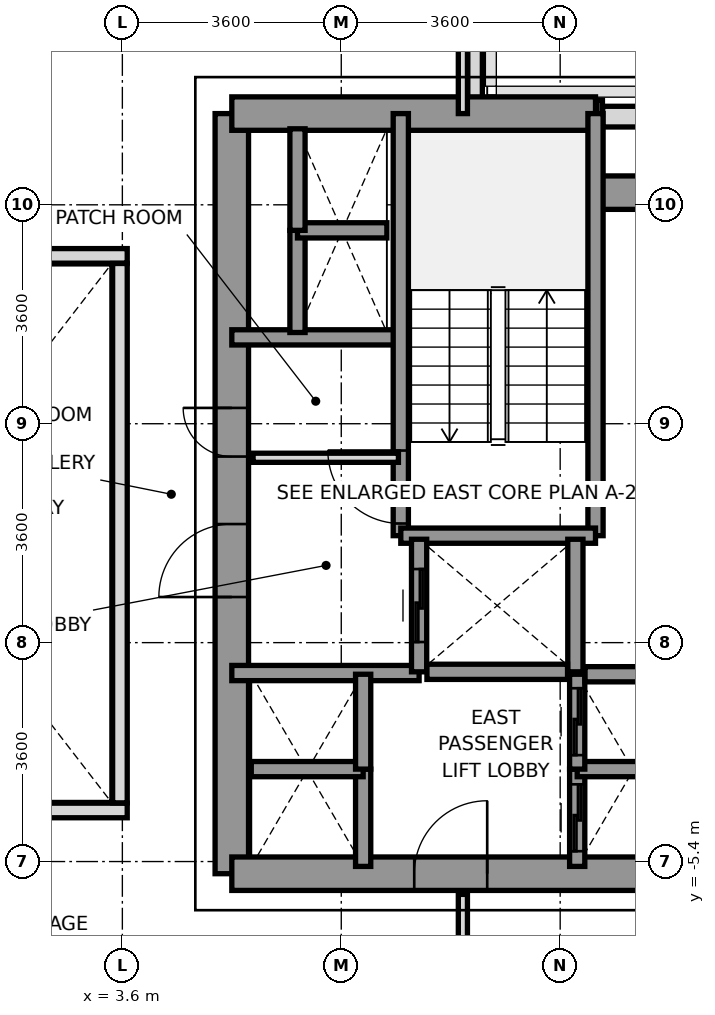
"""IFC4 building model, lengths in metres.
Left out: names, types, materials, properties, quantities, classifications, styles, units other than length and angle.
Written with IfcOpenShell. Run it as: python <this file> out.ifc"""

import sys

from ifc_helpers import new_model, si_unit, direction, frame, frame_2d, origin, place, context, subcontext, project, spatial, rectangle, extrude, source, transform, mapped, element, fill, save


model = new_model("IFC4")
c1 = context("Model", 3, precision=1e-05, world=origin(), true_north=direction((0.0, 1.0)))
c2 = subcontext(c1, "Body", "Model", "MODEL_VIEW")
j1 = project(units=[si_unit("LENGTHUNIT", "METRE"), si_unit("PLANEANGLEUNIT", "RADIAN")], contexts=[c1])
p1 = place(None, origin())
s1 = spatial("IfcSite", under=j1, at=p1, CompositionType="ELEMENT")
p2 = place(p1, origin())
s2 = spatial("IfcBuilding", under=s1, at=p2, CompositionType="ELEMENT")
p3 = place(p2, frame((0.0, 0.0, 34.0)))
s3 = spatial("IfcBuildingStorey", under=s2, at=p3, CompositionType="ELEMENT", Elevation=34.0)
p4 = place(p3, frame((11.498, 6.85, 0.0), z_axis=(0.0, 0.0, 1.0), x_axis=(1.0, 0.0, 0.0)))
e1 = element("IfcWall", 1, at=p4, inside=s3, PredefinedType="SOLIDWALL", context=c2, shape_type="SweptSolid", body=[
    extrude(rectangle(XDim=2.535, YDim=0.34, at=frame_2d((1.268, 0.0))), origin(), (0.0, 0.0, 1.0), 3.2),
])
p5 = place(p3, frame((9.4, 8.397, 0.0), z_axis=(0.0, 0.0, 1.0), x_axis=(0.0, -1.0, 0.0)))
e2 = element("IfcWall", 2, at=p5, inside=s3, PredefinedType="PARAPET", context=c2, shape_type="SweptSolid", body=[
    extrude(rectangle(XDim=1.444, YDim=0.24, at=frame_2d((0.722, 0.0))), origin(), (0.0, 0.0, 1.0), 1.15),
])
p6 = place(p3, frame((11.403, 7.0, 0.0), z_axis=(0.0, 0.0, 1.0), x_axis=(1.0, 0.0, 0.0)))
e3 = element("IfcWall", 3, at=p6, inside=s3, PredefinedType="PARAPET", context=c2, shape_type="SweptSolid", body=[
    extrude(rectangle(XDim=0.092, YDim=0.24, at=frame_2d((0.046, 0.0))), origin(), (0.0, 0.0, 1.0), 1.15),
])
p7 = place(p3, frame((5.4, -5.6, 0.0), z_axis=(0.0, 0.0, 1.0), x_axis=(0.0, 1.0, 0.0)))
e4 = element("IfcWall", 4, at=p7, inside=s3, PredefinedType="SHEAR", context=c2, shape_type="SweptSolid", body=[
    extrude(rectangle(XDim=12.5, YDim=0.55, at=frame_2d((6.25, 0.0))), origin(), (0.0, 0.0, 1.0), 3.2),
])
p8 = place(p7, frame((4.55, 0.0, 0.0)))
e5 = element("IfcOpeningElement", 5, at=p8, cuts=e4, PredefinedType="OPENING", context=c2, shape_type="SweptSolid", body=[
    extrude(rectangle(XDim=1.2, YDim=2.2, at=frame_2d((0.6, 1.1))), frame((0.0, 0.285, 0.0), z_axis=(0.0, -1.0, 0.0), x_axis=(1.0, 0.0, 0.0)), (0.0, 0.0, 1.0), 0.57),
])
p9 = place(p7, frame((6.86, 0.0, 0.0)))
e6 = element("IfcOpeningElement", 6, at=p9, cuts=e4, PredefinedType="OPENING", context=c2, shape_type="SweptSolid", body=[
    extrude(rectangle(XDim=0.8, YDim=2.1, at=frame_2d((0.4, 1.05))), frame((0.0, 0.285, 0.0), z_axis=(0.0, -1.0, 0.0), x_axis=(1.0, 0.0, 0.0)), (0.0, 0.0, 1.0), 0.57),
])
p10 = place(p3, frame((5.4, 6.9, 0.0), z_axis=(0.0, 0.0, 1.0), x_axis=(1.0, 0.0, 0.0)))
e7 = element("IfcWall", 7, at=p10, inside=s3, PredefinedType="SHEAR", context=c2, shape_type="SweptSolid", body=[
    extrude(rectangle(XDim=5.981, YDim=0.55, at=frame_2d((2.991, 0.0))), origin(), (0.0, 0.0, 1.0), 3.2),
])
p11 = place(p3, frame((11.381, 5.6, 0.0), z_axis=(0.0, 0.0, 1.0), x_axis=(1.0, 0.0, 0.0)))
e8 = element("IfcWall", 8, at=p11, inside=s3, PredefinedType="SHEAR", context=c2, shape_type="SweptSolid", body=[
    extrude(rectangle(XDim=1.819, YDim=0.55, at=frame_2d((0.909, 0.0))), origin(), (0.0, 0.0, 1.0), 3.2),
])
p12 = place(p3, frame((5.4, -5.6, 0.0), z_axis=(0.0, 0.0, 1.0), x_axis=(1.0, 0.0, 0.0)))
e9 = element("IfcWall", 9, at=p12, inside=s3, PredefinedType="SHEAR", context=c2, shape_type="SweptSolid", body=[
    extrude(rectangle(XDim=7.8, YDim=0.55, at=frame_2d((3.9, 0.0))), origin(), (0.0, 0.0, 1.0), 3.2),
])
p13 = place(p12, frame((3.0, 0.0, 0.0)))
e10 = element("IfcOpeningElement", 10, at=p13, cuts=e9, PredefinedType="OPENING", context=c2, shape_type="SweptSolid", body=[
    extrude(rectangle(XDim=1.2, YDim=2.2, at=frame_2d((0.6, 1.1))), frame((0.0, 0.285, 0.0), z_axis=(0.0, -1.0, 0.0), x_axis=(1.0, 0.0, 0.0)), (0.0, 0.0, 1.0), 0.57),
])
p14 = place(p3, frame((5.4, 3.22, 0.0), z_axis=(0.0, 0.0, 1.0), x_axis=(1.0, 0.0, 0.0)))
e11 = element("IfcWall", 11, at=p14, inside=s3, PredefinedType="SOLIDWALL", context=c2, shape_type="SweptSolid", body=[
    extrude(rectangle(XDim=2.78, YDim=0.25, at=frame_2d((1.39, 0.0))), origin(), (0.0, 0.0, 1.0), 3.2),
])
p15 = place(p3, frame((5.4, -2.3, 0.0), z_axis=(0.0, 0.0, 1.0), x_axis=(1.0, 0.0, 0.0)))
e12 = element("IfcWall", 12, at=p15, inside=s3, PredefinedType="SOLIDWALL", context=c2, shape_type="SweptSolid", body=[
    extrude(rectangle(XDim=3.08, YDim=0.25, at=frame_2d((1.54, 0.0))), origin(), (0.0, 0.0, 1.0), 3.2),
])
p16 = place(p3, frame((8.179, -0.041, 0.0), z_axis=(0.0, 0.0, 1.0), x_axis=(0.0, 1.0, 0.0)))
e13 = element("IfcWall", 13, at=p16, inside=s3, PredefinedType="SOLIDWALL", context=c2, shape_type="SweptSolid", body=[
    extrude(rectangle(XDim=6.941, YDim=0.25, at=frame_2d((3.47, 0.0))), origin(), (0.0, 0.0, 1.0), 3.2),
])
p17 = place(p16, frame((0.2, 0.0, 0.0)))
e14 = element("IfcOpeningElement", 14, at=p17, cuts=e13, PredefinedType="OPENING", context=c2, shape_type="SweptSolid", body=[
    extrude(rectangle(XDim=1.2, YDim=2.2, at=frame_2d((0.6, 1.1))), frame((0.0, 0.135, 0.0), z_axis=(0.0, -1.0, 0.0), x_axis=(1.0, 0.0, 0.0)), (0.0, 0.0, 1.0), 0.27),
])
p18 = place(p3, frame((11.381, -0.041, 0.0), z_axis=(0.0, 0.0, 1.0), x_axis=(0.0, 1.0, 0.0)))
e15 = element("IfcWall", 15, at=p18, inside=s3, PredefinedType="SOLIDWALL", context=c2, shape_type="SweptSolid", body=[
    extrude(rectangle(XDim=6.941, YDim=0.25, at=frame_2d((3.47, 0.0))), origin(), (0.0, 0.0, 1.0), 3.2),
])
p19 = place(p3, frame((8.179, -0.041, 0.0), z_axis=(0.0, 0.0, 1.0), x_axis=(1.0, 0.0, 0.0)))
e16 = element("IfcWall", 16, at=p19, inside=s3, PredefinedType="SOLIDWALL", context=c2, shape_type="SweptSolid", body=[
    extrude(rectangle(XDim=3.202, YDim=0.25, at=frame_2d((1.601, 0.0))), origin(), (0.0, 0.0, 1.0), 3.2),
])
p20 = place(p3, frame((8.48, -2.28, 0.0), z_axis=(0.0, 0.0, 1.0), x_axis=(0.0, 1.0, 0.0)))
e17 = element("IfcWall", 17, at=p20, inside=s3, PredefinedType="SOLIDWALL", context=c2, shape_type="SweptSolid", body=[
    extrude(rectangle(XDim=2.18, YDim=0.25, at=frame_2d((1.09, 0.0))), origin(), (0.0, 0.0, 1.0), 3.2),
])
p21 = place(p20, frame((0.49, 0.0, 0.0)))
e18 = element("IfcOpeningElement", 18, at=p21, cuts=e17, PredefinedType="OPENING", context=c2, shape_type="SweptSolid", body=[
    extrude(rectangle(XDim=1.2, YDim=2.2, at=frame_2d((0.6, 1.1))), frame((0.0, 0.135, 0.0), z_axis=(0.0, -1.0, 0.0), x_axis=(1.0, 0.0, 0.0)), (0.0, 0.0, 1.0), 0.27),
])
p22 = place(p3, frame((11.05, -2.28, 0.0), z_axis=(0.0, 0.0, 1.0), x_axis=(0.0, 1.0, 0.0)))
e19 = element("IfcWall", 19, at=p22, inside=s3, PredefinedType="SOLIDWALL", context=c2, shape_type="SweptSolid", body=[
    extrude(rectangle(XDim=2.18, YDim=0.25, at=frame_2d((1.09, 0.0))), origin(), (0.0, 0.0, 1.0), 3.2),
])
p23 = place(p3, frame((8.609, -2.28, 0.0), z_axis=(0.0, 0.0, 1.0), x_axis=(1.0, 0.0, 0.0)))
e20 = element("IfcWall", 20, at=p23, inside=s3, PredefinedType="SOLIDWALL", context=c2, shape_type="SweptSolid", body=[
    extrude(rectangle(XDim=2.312, YDim=0.25, at=frame_2d((1.156, 0.0))), origin(), (0.0, 0.0, 1.0), 3.2),
])
p24 = place(p3, frame((11.08, -5.48, 0.0), z_axis=(0.0, 0.0, 1.0), x_axis=(0.0, 1.0, 0.0)))
e21 = element("IfcWall", 21, at=p24, inside=s3, PredefinedType="SOLIDWALL", context=c2, shape_type="SweptSolid", body=[
    extrude(rectangle(XDim=1.6, YDim=0.25, at=frame_2d((0.8, 0.0))), origin(), (0.0, 0.0, 1.0), 3.2),
])
p25 = place(p24, frame((0.25, 0.0, 0.0)))
e22 = element("IfcOpeningElement", 22, at=p25, cuts=e21, PredefinedType="OPENING", context=c2, shape_type="SweptSolid", body=[
    extrude(rectangle(XDim=1.1, YDim=2.2, at=frame_2d((0.55, 1.1))), frame((0.0, 0.135, 0.0), z_axis=(0.0, -1.0, 0.0), x_axis=(1.0, 0.0, 0.0)), (0.0, 0.0, 1.0), 0.27),
])
p26 = place(p3, frame((11.08, -3.88, 0.0), z_axis=(0.0, 0.0, 1.0), x_axis=(1.0, 0.0, 0.0)))
e23 = element("IfcWall", 23, at=p26, inside=s3, PredefinedType="SOLIDWALL", context=c2, shape_type="SweptSolid", body=[
    extrude(rectangle(XDim=1.84, YDim=0.25, at=frame_2d((0.92, 0.0))), origin(), (0.0, 0.0, 1.0), 3.2),
])
p27 = place(p3, frame((11.08, -3.88, 0.0), z_axis=(0.0, 0.0, 1.0), x_axis=(0.0, 1.0, 0.0)))
e24 = element("IfcWall", 24, at=p27, inside=s3, PredefinedType="SOLIDWALL", context=c2, shape_type="SweptSolid", body=[
    extrude(rectangle(XDim=1.56, YDim=0.25, at=frame_2d((0.78, 0.0))), origin(), (0.0, 0.0, 1.0), 3.2),
])
p28 = place(p27, frame((0.23, 0.0, 0.0)))
e25 = element("IfcOpeningElement", 25, at=p28, cuts=e24, PredefinedType="OPENING", context=c2, shape_type="SweptSolid", body=[
    extrude(rectangle(XDim=1.1, YDim=2.2, at=frame_2d((0.55, 1.1))), frame((0.0, 0.135, 0.0), z_axis=(0.0, -1.0, 0.0), x_axis=(1.0, 0.0, 0.0)), (0.0, 0.0, 1.0), 0.27),
])
p29 = place(p3, frame((11.209, -2.32, 0.0), z_axis=(0.0, 0.0, 1.0), x_axis=(1.0, 0.0, 0.0)))
e26 = element("IfcWall", 26, at=p29, inside=s3, PredefinedType="SOLIDWALL", context=c2, shape_type="SweptSolid", body=[
    extrude(rectangle(XDim=1.582, YDim=0.25, at=frame_2d((0.791, 0.0))), origin(), (0.0, 0.0, 1.0), 3.2),
])
p30 = place(p3, frame((7.56, -5.48, 0.0), z_axis=(0.0, 0.0, 1.0), x_axis=(0.0, 1.0, 0.0)))
e27 = element("IfcWall", 27, at=p30, inside=s3, PredefinedType="SOLIDWALL", context=c2, shape_type="SweptSolid", body=[
    extrude(rectangle(XDim=1.6, YDim=0.25, at=frame_2d((0.8, 0.0))), origin(), (0.0, 0.0, 1.0), 3.2),
])
p31 = place(p3, frame((5.72, -3.88, 0.0), z_axis=(0.0, 0.0, 1.0), x_axis=(1.0, 0.0, 0.0)))
e28 = element("IfcWall", 28, at=p31, inside=s3, PredefinedType="SOLIDWALL", context=c2, shape_type="SweptSolid", body=[
    extrude(rectangle(XDim=1.84, YDim=0.25, at=frame_2d((0.92, 0.0))), origin(), (0.0, 0.0, 1.0), 3.2),
])
p32 = place(p3, frame((7.56, -3.88, 0.0), z_axis=(0.0, 0.0, 1.0), x_axis=(0.0, 1.0, 0.0)))
e29 = element("IfcWall", 29, at=p32, inside=s3, PredefinedType="SOLIDWALL", context=c2, shape_type="SweptSolid", body=[
    extrude(rectangle(XDim=1.56, YDim=0.25, at=frame_2d((0.78, 0.0))), origin(), (0.0, 0.0, 1.0), 3.2),
])
p33 = place(p3, frame((6.48, 3.3, 0.0), z_axis=(0.0, 0.0, 1.0), x_axis=(0.0, 1.0, 0.0)))
e30 = element("IfcWall", 30, at=p33, inside=s3, PredefinedType="SOLIDWALL", context=c2, shape_type="SweptSolid", body=[
    extrude(rectangle(XDim=1.68, YDim=0.25, at=frame_2d((0.84, 0.0))), origin(), (0.0, 0.0, 1.0), 3.2),
])
p34 = place(p3, frame((6.48, 4.98, 0.0), z_axis=(0.0, 0.0, 1.0), x_axis=(1.0, 0.0, 0.0)))
e31 = element("IfcWall", 31, at=p34, inside=s3, PredefinedType="SOLIDWALL", context=c2, shape_type="SweptSolid", body=[
    extrude(rectangle(XDim=1.47, YDim=0.25, at=frame_2d((0.735, 0.0))), origin(), (0.0, 0.0, 1.0), 3.2),
])
p35 = place(p3, frame((6.48, 4.98, 0.0), z_axis=(0.0, 0.0, 1.0), x_axis=(0.0, 1.0, 0.0)))
e32 = element("IfcWall", 32, at=p35, inside=s3, PredefinedType="SOLIDWALL", context=c2, shape_type="SweptSolid", body=[
    extrude(rectangle(XDim=1.67, YDim=0.25, at=frame_2d((0.835, 0.0))), origin(), (0.0, 0.0, 1.0), 3.2),
])
p36 = place(p3, frame((5.75, 1.24, 0.0), z_axis=(0.0, 0.0, 1.0), x_axis=(1.0, 0.0, 0.0)))
e33 = element("IfcWall", 33, at=p36, inside=s3, PredefinedType="PARTITIONING", context=c2, shape_type="SweptSolid", body=[
    extrude(rectangle(XDim=2.39, YDim=0.15, at=frame_2d((1.195, 0.0))), origin(), (0.0, 0.0, 1.0), 2.3),
])
p37 = place(p3, frame((9.2, 6.9, 0.0), z_axis=(0.0, 0.0, 1.0), x_axis=(0.0, 1.0, 0.0)))
e34 = element("IfcWall", 34, at=p37, inside=s3, PredefinedType="PARTITIONING", context=c2, shape_type="SweptSolid", body=[
    extrude(rectangle(XDim=8.78, YDim=0.15, at=frame_2d((4.39, 0.0))), origin(), (0.0, 0.0, 1.0), 2.71),
])
p38 = place(p3, frame((9.2, -15.68, 0.0), z_axis=(0.0, 0.0, 1.0), x_axis=(0.0, 1.0, 0.0)))
e35 = element("IfcWall", 35, at=p38, inside=s3, PredefinedType="PARTITIONING", context=c2, shape_type="SweptSolid", body=[
    extrude(rectangle(XDim=9.74, YDim=0.15, at=frame_2d((4.87, 0.0))), origin(), (0.0, 0.0, 1.0), 2.71),
])
for number, where, z_axis, x_axis in (
    (36, (-3.68, -4.56, 0.0), (0.0, 0.0, 1.0), (1.0, 0.0, 0.0)),
    (37, (-3.68, 4.56, 0.0), (0.0, 0.0, 1.0), (1.0, 0.0, 0.0)),
):
    element("IfcWall", number, at=place(p3, frame(where, z_axis=z_axis, x_axis=x_axis)), inside=s3, PredefinedType="PARAPET", context=c2, shape_type="SweptSolid", body=[
        extrude(rectangle(XDim=7.36, YDim=0.24, at=frame_2d((3.68, 0.0))), origin(), (0.0, 0.0, 1.0), 1.15),
    ])
p39 = place(p3, frame((3.56, -4.435, 0.0), z_axis=(0.0, 0.0, 1.0), x_axis=(0.0, 1.0, 0.0)))
e38 = element("IfcWall", 38, at=p39, inside=s3, PredefinedType="PARAPET", context=c2, shape_type="SweptSolid", body=[
    extrude(rectangle(XDim=8.87, YDim=0.24, at=frame_2d((4.435, 0.0))), origin(), (0.0, 0.0, 1.0), 1.15),
])
m1 = source(origin(), c2, "Body", "SweptSolid", [
    extrude(rectangle(XDim=1.2, YDim=2.2, at=frame_2d((0.6, 1.1))), frame((0.0, 0.025, 0.0), z_axis=(0.0, -1.0, 0.0), x_axis=(1.0, 0.0, 0.0)), (0.0, 0.0, 1.0), 0.05),
])
p40 = place(p17, origin())
e39 = element("IfcDoor", 39, at=p40, inside=s3, OperationType="SINGLE_SWING_RIGHT", PredefinedType="DOOR", context=c2, shape_type="MappedRepresentation", body=[
    mapped(m1, transform((0.0, 0.0, 0.0), x_axis=(1.0, 0.0, 0.0), y_axis=(0.0, 1.0, 0.0), z_axis=(0.0, 0.0, 1.0), scale=1.0)),
])
fill(e14, e39)
p41 = place(p8, origin())
e40 = element("IfcDoor", 40, at=p41, inside=s3, OperationType="SINGLE_SWING_LEFT", PredefinedType="DOOR", context=c2, shape_type="MappedRepresentation", body=[
    mapped(m1, transform((0.0, 0.0, 0.0), x_axis=(1.0, 0.0, 0.0), y_axis=(0.0, 1.0, 0.0), z_axis=(0.0, 0.0, 1.0), scale=1.0)),
])
fill(e5, e40)
p42 = place(p13, origin())
e41 = element("IfcDoor", 41, at=p42, inside=s3, OperationType="SINGLE_SWING_RIGHT", PredefinedType="DOOR", context=c2, shape_type="MappedRepresentation", body=[
    mapped(m1, transform((0.0, 0.0, 0.0), x_axis=(1.0, 0.0, 0.0), y_axis=(0.0, 1.0, 0.0), z_axis=(0.0, 0.0, 1.0), scale=1.0)),
])
fill(e10, e41)
m2 = source(origin(), c2, "Body", "SweptSolid", [
    extrude(rectangle(XDim=0.8, YDim=2.1, at=frame_2d((0.4, 1.05))), frame((0.0, 0.025, 0.0), z_axis=(0.0, -1.0, 0.0), x_axis=(1.0, 0.0, 0.0)), (0.0, 0.0, 1.0), 0.05),
])
p43 = place(p9, origin())
e42 = element("IfcDoor", 42, at=p43, inside=s3, OperationType="SINGLE_SWING_RIGHT", PredefinedType="DOOR", context=c2, shape_type="MappedRepresentation", body=[
    mapped(m2, transform((0.0, 0.0, 0.0), x_axis=(1.0, 0.0, 0.0), y_axis=(0.0, 1.0, 0.0), z_axis=(0.0, 0.0, 1.0), scale=1.0)),
])
fill(e6, e42)
p44 = place(p21, origin())
e43 = element("IfcDoor", 43, at=p44, inside=s3, OperationType="SLIDING_TO_RIGHT", PredefinedType="DOOR", context=c2, shape_type="MappedRepresentation", body=[
    mapped(m1, transform((0.0, 0.0, 0.0), x_axis=(1.0, 0.0, 0.0), y_axis=(0.0, 1.0, 0.0), z_axis=(0.0, 0.0, 1.0), scale=1.0)),
])
fill(e18, e43)
m3 = source(origin(), c2, "Body", "SweptSolid", [
    extrude(rectangle(XDim=1.1, YDim=2.2, at=frame_2d((0.55, 1.1))), frame((0.0, 0.025, 0.0), z_axis=(0.0, -1.0, 0.0), x_axis=(1.0, 0.0, 0.0)), (0.0, 0.0, 1.0), 0.05),
])
p45 = place(p25, origin())
e44 = element("IfcDoor", 44, at=p45, inside=s3, OperationType="SLIDING_TO_LEFT", PredefinedType="DOOR", context=c2, shape_type="MappedRepresentation", body=[
    mapped(m3, transform((0.0, 0.0, 0.0), x_axis=(1.0, 0.0, 0.0), y_axis=(0.0, 1.0, 0.0), z_axis=(0.0, 0.0, 1.0), scale=1.0)),
])
fill(e22, e44)
p46 = place(p28, origin())
e45 = element("IfcDoor", 45, at=p46, inside=s3, OperationType="SLIDING_TO_LEFT", PredefinedType="DOOR", context=c2, shape_type="MappedRepresentation", body=[
    mapped(m3, transform((0.0, 0.0, 0.0), x_axis=(1.0, 0.0, 0.0), y_axis=(0.0, 1.0, 0.0), z_axis=(0.0, 0.0, 1.0), scale=1.0)),
])
fill(e25, e45)
save(model, sys.argv[1])
